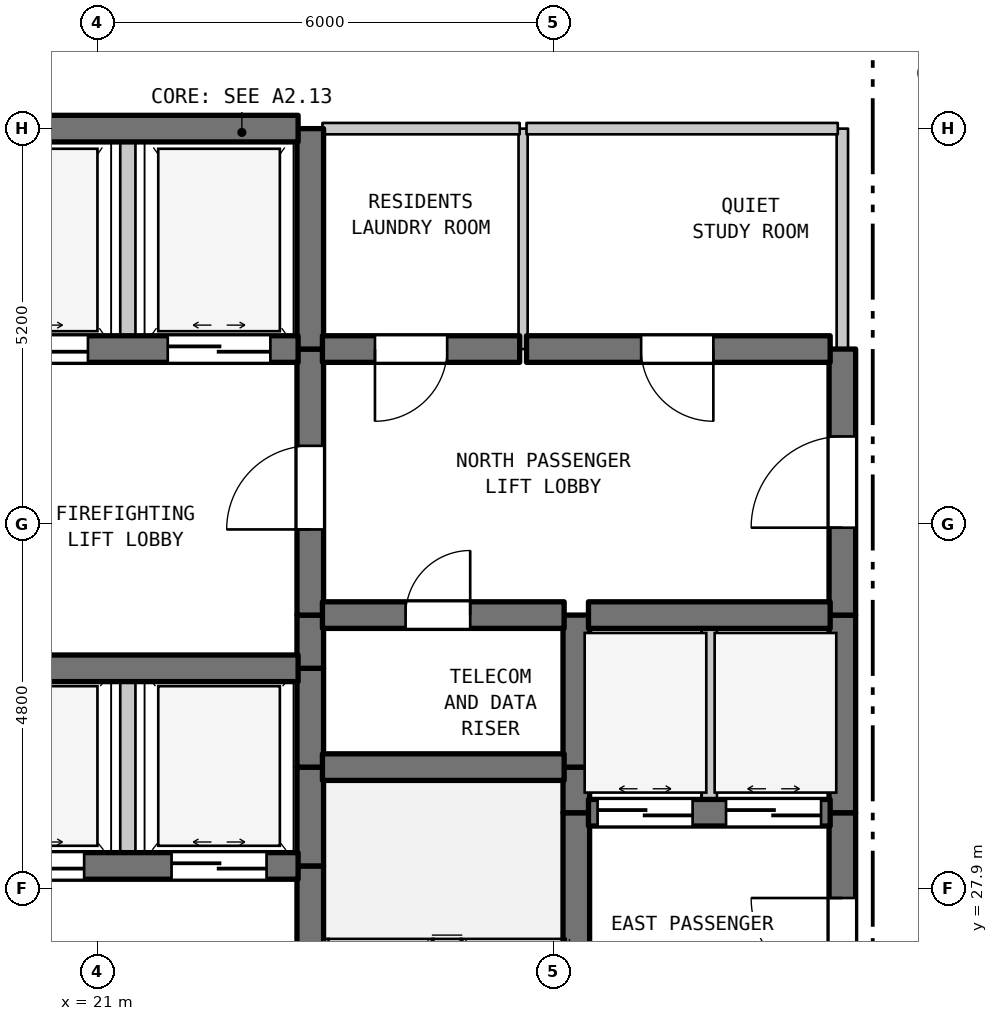
"""IFC4 building model, lengths in metres.
Left out: names, types, materials, properties, quantities, classifications, styles, units other than length and angle.
Written with IfcOpenShell. Run it as: python <this file> out.ifc"""

import sys

from ifc_helpers import new_model, si_unit, direction, frame, frame_2d, origin, place, context, subcontext, project, spatial, rectangle, extrude, element, fill, save


model = new_model("IFC4")
c1 = context("Model", 3, precision=1e-05, world=origin(), true_north=direction((0.0, 1.0)))
c2 = subcontext(c1, "Body", "Model", "MODEL_VIEW")
j1 = project(units=[si_unit("LENGTHUNIT", "METRE"), si_unit("PLANEANGLEUNIT", "RADIAN")], contexts=[c1])
p1 = place(None, origin())
s1 = spatial("IfcSite", under=j1, at=p1, CompositionType="ELEMENT")
p2 = place(p1, origin())
s2 = spatial("IfcBuilding", under=s1, at=p2, CompositionType="ELEMENT")
p3 = place(p2, frame((0.0, 0.0, 199.5)))
s3 = spatial("IfcBuildingStorey", under=s2, at=p3, CompositionType="ELEMENT", Elevation=199.5)
p4 = place(p3, frame((21.4, 28.2, 0.0), z_axis=(0.0, 0.0, 1.0), x_axis=(0.0, 1.0, 0.0)))
e1 = element("IfcWall", 1, at=p4, inside=s3, PredefinedType="STANDARD", context=c2, shape_type="SweptSolid", body=[
    extrude(rectangle(XDim=2.6, YDim=0.2, at=frame_2d((1.3, 0.0))), origin(), (0.0, 0.0, 1.0), 3.39),
])
p5 = place(p3, frame((21.4, 35.0, 0.0), z_axis=(0.0, 0.0, 1.0), x_axis=(0.0, 1.0, 0.0)))
e2 = element("IfcWall", 2, at=p5, inside=s3, PredefinedType="STANDARD", context=c2, shape_type="SweptSolid", body=[
    extrude(rectangle(XDim=2.9, YDim=0.2, at=frame_2d((1.45, 0.0))), origin(), (0.0, 0.0, 1.0), 3.39),
])
p6 = place(p3, frame((23.8, 22.7, 0.0), z_axis=(0.0, 0.0, 1.0), x_axis=(0.0, 1.0, 0.0)))
e3 = element("IfcWall", 3, at=p6, inside=s3, PredefinedType="SHEAR", context=c2, shape_type="SweptSolid", body=[
    extrude(rectangle(XDim=5.5, YDim=0.35, at=frame_2d((2.75, 0.0))), origin(), (0.0, 0.0, 1.0), 3.39),
])
p7 = place(p6, frame((0.235, 0.0, 0.0)))
e4 = element("IfcOpeningElement", 4, at=p7, cuts=e3, PredefinedType="OPENING", context=c2, shape_type="SweptSolid", body=[
    extrude(rectangle(XDim=1.1, YDim=2.15, at=frame_2d((0.55, 1.075))), frame((0.0, 0.185, 0.0), z_axis=(0.0, -1.0, 0.0), x_axis=(1.0, 0.0, 0.0)), (0.0, 0.0, 1.0), 0.37),
])
for number, where, z_axis, x_axis in (
    (5, (23.8, 28.2, 0.0), (0.0, 0.0, 1.0), (0.0, 1.0, 0.0)),
    (6, (23.8, 29.5, 0.0), (0.0, 0.0, 1.0), (0.0, 1.0, 0.0)),
):
    element("IfcWall", number, at=place(p3, frame(where, z_axis=z_axis, x_axis=x_axis)), inside=s3, PredefinedType="SHEAR", context=c2, shape_type="SweptSolid", body=[
        extrude(rectangle(XDim=1.3, YDim=0.35, at=frame_2d((0.65, 0.0))), origin(), (0.0, 0.0, 1.0), 3.39),
    ])
p8 = place(p3, frame((23.8, 30.8, 0.0), z_axis=(0.0, 0.0, 1.0), x_axis=(0.0, 1.0, 0.0)))
e7 = element("IfcWall", 7, at=p8, inside=s3, PredefinedType="SHEAR", context=c2, shape_type="SweptSolid", body=[
    extrude(rectangle(XDim=0.7, YDim=0.35, at=frame_2d((0.35, 0.0))), origin(), (0.0, 0.0, 1.0), 3.39),
])
p9 = place(p3, frame((23.8, 31.5, 0.0), z_axis=(0.0, 0.0, 1.0), x_axis=(0.0, 1.0, 0.0)))
e8 = element("IfcWall", 8, at=p9, inside=s3, PredefinedType="SHEAR", context=c2, shape_type="SweptSolid", body=[
    extrude(rectangle(XDim=3.5, YDim=0.35, at=frame_2d((1.75, 0.0))), origin(), (0.0, 0.0, 1.0), 3.39),
])
p10 = place(p9, frame((1.127, 0.0, 0.0)))
e9 = element("IfcOpeningElement", 9, at=p10, cuts=e8, PredefinedType="OPENING", context=c2, shape_type="SweptSolid", body=[
    extrude(rectangle(XDim=1.1, YDim=2.15, at=frame_2d((0.55, 1.075))), frame((0.0, 0.185, 0.0), z_axis=(0.0, -1.0, 0.0), x_axis=(1.0, 0.0, 0.0)), (0.0, 0.0, 1.0), 0.37),
])
p11 = place(p3, frame((23.8, 35.0, 0.0), z_axis=(0.0, 0.0, 1.0), x_axis=(0.0, 1.0, 0.0)))
e10 = element("IfcWall", 10, at=p11, inside=s3, PredefinedType="SHEAR", context=c2, shape_type="SweptSolid", body=[
    extrude(rectangle(XDim=2.9, YDim=0.35, at=frame_2d((1.45, 0.0))), origin(), (0.0, 0.0, 1.0), 3.39),
])
p12 = place(p3, frame((26.6, 35.0, 0.0), z_axis=(0.0, 0.0, 1.0), x_axis=(0.0, 1.0, 0.0)))
e11 = element("IfcWall", 11, at=p12, inside=s3, PredefinedType="PARTITIONING", context=c2, shape_type="SweptSolid", body=[
    extrude(rectangle(XDim=2.9, YDim=0.12, at=frame_2d((1.45, 0.0))), origin(), (0.0, 0.0, 1.0), 3.39),
])
p13 = place(p3, frame((27.3, 25.6, 0.0), z_axis=(0.0, 0.0, 1.0), x_axis=(0.0, 1.0, 0.0)))
e12 = element("IfcWall", 12, at=p13, inside=s3, PredefinedType="SHEAR", context=c2, shape_type="SweptSolid", body=[
    extrude(rectangle(XDim=3.3, YDim=0.35, at=frame_2d((1.65, 0.0))), origin(), (0.0, 0.0, 1.0), 3.39),
])
p14 = place(p3, frame((27.3, 28.9, 0.0), z_axis=(0.0, 0.0, 1.0), x_axis=(0.0, 1.0, 0.0)))
e13 = element("IfcWall", 13, at=p14, inside=s3, PredefinedType="SHEAR", context=c2, shape_type="SweptSolid", body=[
    extrude(rectangle(XDim=0.6, YDim=0.35, at=frame_2d((0.3, 0.0))), origin(), (0.0, 0.0, 1.0), 3.39),
])
p15 = place(p3, frame((27.3, 29.5, 0.0), z_axis=(0.0, 0.0, 1.0), x_axis=(0.0, 1.0, 0.0)))
e14 = element("IfcWall", 14, at=p15, inside=s3, PredefinedType="SHEAR", context=c2, shape_type="SweptSolid", body=[
    extrude(rectangle(XDim=2.0, YDim=0.35, at=frame_2d((1.0, 0.0))), origin(), (0.0, 0.0, 1.0), 3.39),
])
p16 = place(p3, frame((29.05, 28.9, 0.0), z_axis=(0.0, 0.0, 1.0), x_axis=(0.0, 1.0, 0.0)))
e15 = element("IfcWall", 15, at=p16, inside=s3, PredefinedType="STANDARD", context=c2, shape_type="SweptSolid", body=[
    extrude(rectangle(XDim=2.6, YDim=0.2, at=frame_2d((1.3, 0.0))), origin(), (0.0, 0.0, 1.0), 3.39),
])
p17 = place(p3, frame((30.8, 25.6, 0.0), z_axis=(0.0, 0.0, 1.0), x_axis=(0.0, 1.0, 0.0)))
e16 = element("IfcWall", 16, at=p17, inside=s3, PredefinedType="SHEAR", context=c2, shape_type="SweptSolid", body=[
    extrude(rectangle(XDim=3.3, YDim=0.35, at=frame_2d((1.65, 0.0))), origin(), (0.0, 0.0, 1.0), 3.39),
])
p18 = place(p17, frame((0.978, 0.0, 0.0)))
e17 = element("IfcOpeningElement", 17, at=p18, cuts=e16, PredefinedType="OPENING", context=c2, shape_type="SweptSolid", body=[
    extrude(rectangle(XDim=1.2, YDim=2.2, at=frame_2d((0.6, 1.1))), frame((0.0, 0.185, 0.0), z_axis=(0.0, -1.0, 0.0), x_axis=(1.0, 0.0, 0.0)), (0.0, 0.0, 1.0), 0.37),
])
p19 = place(p3, frame((30.8, 28.9, 0.0), z_axis=(0.0, 0.0, 1.0), x_axis=(0.0, 1.0, 0.0)))
e18 = element("IfcWall", 18, at=p19, inside=s3, PredefinedType="SHEAR", context=c2, shape_type="SweptSolid", body=[
    extrude(rectangle(XDim=2.6, YDim=0.35, at=frame_2d((1.3, 0.0))), origin(), (0.0, 0.0, 1.0), 3.39),
])
p20 = place(p3, frame((30.8, 31.5, 0.0), z_axis=(0.0, 0.0, 1.0), x_axis=(0.0, 1.0, 0.0)))
e19 = element("IfcWall", 19, at=p20, inside=s3, PredefinedType="SHEAR", context=c2, shape_type="SweptSolid", body=[
    extrude(rectangle(XDim=3.5, YDim=0.35, at=frame_2d((1.75, 0.0))), origin(), (0.0, 0.0, 1.0), 3.39),
])
p21 = place(p20, frame((1.15, 0.0, 0.0)))
e20 = element("IfcOpeningElement", 20, at=p21, cuts=e19, PredefinedType="OPENING", context=c2, shape_type="SweptSolid", body=[
    extrude(rectangle(XDim=1.2, YDim=2.2, at=frame_2d((0.6, 1.1))), frame((0.0, 0.185, 0.0), z_axis=(0.0, -1.0, 0.0), x_axis=(1.0, 0.0, 0.0)), (0.0, 0.0, 1.0), 0.37),
])
p22 = place(p3, frame((30.8, 35.0, 0.0), z_axis=(0.0, 0.0, 1.0), x_axis=(0.0, 1.0, 0.0)))
e21 = element("IfcWall", 21, at=p22, inside=s3, PredefinedType="STANDARD", context=c2, shape_type="SweptSolid", body=[
    extrude(rectangle(XDim=2.9, YDim=0.15, at=frame_2d((1.45, 0.0))), origin(), (0.0, 0.0, 1.0), 3.39),
])
p23 = place(p3, frame((19.16, 28.2, 0.0), z_axis=(0.0, 0.0, 1.0), x_axis=(1.0, 0.0, 0.0)))
e22 = element("IfcWall", 22, at=p23, inside=s3, PredefinedType="SHEAR", context=c2, shape_type="SweptSolid", body=[
    extrude(rectangle(XDim=4.48, YDim=0.35, at=frame_2d((2.24, 0.0))), origin(), (0.0, 0.0, 1.0), 3.39),
])
p24 = place(p23, frame((0.415, 0.0, 0.0)))
e23 = element("IfcOpeningElement", 23, at=p24, cuts=e22, PredefinedType="OPENING", context=c2, shape_type="SweptSolid", body=[
    extrude(rectangle(XDim=1.25, YDim=2.2, at=frame_2d((0.625, 1.1))), frame((0.0, 0.185, 0.0), z_axis=(0.0, -1.0, 0.0), x_axis=(1.0, 0.0, 0.0)), (0.0, 0.0, 1.0), 0.37),
])
p25 = place(p23, frame((2.815, 0.0, 0.0)))
e24 = element("IfcOpeningElement", 24, at=p25, cuts=e22, PredefinedType="OPENING", context=c2, shape_type="SweptSolid", body=[
    extrude(rectangle(XDim=1.25, YDim=2.2, at=frame_2d((0.625, 1.1))), frame((0.0, 0.185, 0.0), z_axis=(0.0, -1.0, 0.0), x_axis=(1.0, 0.0, 0.0)), (0.0, 0.0, 1.0), 0.37),
])
p26 = place(p3, frame((27.46, 28.9, 0.0), z_axis=(0.0, 0.0, 1.0), x_axis=(1.0, 0.0, 0.0)))
e25 = element("IfcWall", 25, at=p26, inside=s3, PredefinedType="SHEAR", context=c2, shape_type="SweptSolid", body=[
    extrude(rectangle(XDim=3.18, YDim=0.35, at=frame_2d((1.59, 0.0))), origin(), (0.0, 0.0, 1.0), 3.39),
])
p27 = place(p26, frame((0.12, 0.0, 0.0)))
e26 = element("IfcOpeningElement", 26, at=p27, cuts=e25, PredefinedType="OPENING", context=c2, shape_type="SweptSolid", body=[
    extrude(rectangle(XDim=1.25, YDim=2.2, at=frame_2d((0.625, 1.1))), frame((0.0, 0.185, 0.0), z_axis=(0.0, -1.0, 0.0), x_axis=(1.0, 0.0, 0.0)), (0.0, 0.0, 1.0), 0.37),
])
p28 = place(p26, frame((1.81, 0.0, 0.0)))
e27 = element("IfcOpeningElement", 27, at=p28, cuts=e25, PredefinedType="OPENING", context=c2, shape_type="SweptSolid", body=[
    extrude(rectangle(XDim=1.25, YDim=2.2, at=frame_2d((0.625, 1.1))), frame((0.0, 0.185, 0.0), z_axis=(0.0, -1.0, 0.0), x_axis=(1.0, 0.0, 0.0)), (0.0, 0.0, 1.0), 0.37),
])
p29 = place(p3, frame((23.96, 29.5, 0.0), z_axis=(0.0, 0.0, 1.0), x_axis=(1.0, 0.0, 0.0)))
e28 = element("IfcWall", 28, at=p29, inside=s3, PredefinedType="SHEAR", context=c2, shape_type="SweptSolid", body=[
    extrude(rectangle(XDim=3.18, YDim=0.35, at=frame_2d((1.59, 0.0))), origin(), (0.0, 0.0, 1.0), 3.39),
])
p30 = place(p3, frame((19.16, 30.8, 0.0), z_axis=(0.0, 0.0, 1.0), x_axis=(1.0, 0.0, 0.0)))
e29 = element("IfcWall", 29, at=p30, inside=s3, PredefinedType="SHEAR", context=c2, shape_type="SweptSolid", body=[
    extrude(rectangle(XDim=4.48, YDim=0.35, at=frame_2d((2.24, 0.0))), origin(), (0.0, 0.0, 1.0), 3.39),
])
p31 = place(p3, frame((23.96, 31.5, 0.0), z_axis=(0.0, 0.0, 1.0), x_axis=(1.0, 0.0, 0.0)))
e30 = element("IfcWall", 30, at=p31, inside=s3, PredefinedType="SHEAR", context=c2, shape_type="SweptSolid", body=[
    extrude(rectangle(XDim=3.18, YDim=0.35, at=frame_2d((1.59, 0.0))), origin(), (0.0, 0.0, 1.0), 3.39),
])
p32 = place(p31, frame((1.094, 0.0, 0.0)))
e31 = element("IfcOpeningElement", 31, at=p32, cuts=e30, PredefinedType="OPENING", context=c2, shape_type="SweptSolid", body=[
    extrude(rectangle(XDim=0.85, YDim=2.1, at=frame_2d((0.425, 1.05))), frame((0.0, 0.185, 0.0), z_axis=(0.0, -1.0, 0.0), x_axis=(1.0, 0.0, 0.0)), (0.0, 0.0, 1.0), 0.37),
])
p33 = place(p3, frame((27.46, 31.5, 0.0), z_axis=(0.0, 0.0, 1.0), x_axis=(1.0, 0.0, 0.0)))
e32 = element("IfcWall", 32, at=p33, inside=s3, PredefinedType="SHEAR", context=c2, shape_type="SweptSolid", body=[
    extrude(rectangle(XDim=3.18, YDim=0.35, at=frame_2d((1.59, 0.0))), origin(), (0.0, 0.0, 1.0), 3.39),
])
p34 = place(p3, frame((19.16, 35.0, 0.0), z_axis=(0.0, 0.0, 1.0), x_axis=(1.0, 0.0, 0.0)))
e33 = element("IfcWall", 33, at=p34, inside=s3, PredefinedType="SHEAR", context=c2, shape_type="SweptSolid", body=[
    extrude(rectangle(XDim=4.48, YDim=0.35, at=frame_2d((2.24, 0.0))), origin(), (0.0, 0.0, 1.0), 3.39),
])
p35 = place(p34, frame((0.365, 0.0, 0.0)))
e34 = element("IfcOpeningElement", 34, at=p35, cuts=e33, PredefinedType="OPENING", context=c2, shape_type="SweptSolid", body=[
    extrude(rectangle(XDim=1.35, YDim=2.2, at=frame_2d((0.675, 1.1))), frame((0.0, 0.185, 0.0), z_axis=(0.0, -1.0, 0.0), x_axis=(1.0, 0.0, 0.0)), (0.0, 0.0, 1.0), 0.37),
])
p36 = place(p34, frame((2.765, 0.0, 0.0)))
e35 = element("IfcOpeningElement", 35, at=p36, cuts=e33, PredefinedType="OPENING", context=c2, shape_type="SweptSolid", body=[
    extrude(rectangle(XDim=1.35, YDim=2.2, at=frame_2d((0.675, 1.1))), frame((0.0, 0.185, 0.0), z_axis=(0.0, -1.0, 0.0), x_axis=(1.0, 0.0, 0.0)), (0.0, 0.0, 1.0), 0.37),
])
p37 = place(p3, frame((23.96, 35.0, 0.0), z_axis=(0.0, 0.0, 1.0), x_axis=(1.0, 0.0, 0.0)))
e36 = element("IfcWall", 36, at=p37, inside=s3, PredefinedType="SHEAR", context=c2, shape_type="SweptSolid", body=[
    extrude(rectangle(XDim=2.595, YDim=0.35, at=frame_2d((1.297, 0.0))), origin(), (0.0, 0.0, 1.0), 3.39),
])
p38 = place(p37, frame((0.691, 0.0, 0.0)))
e37 = element("IfcOpeningElement", 37, at=p38, cuts=e36, PredefinedType="OPENING", context=c2, shape_type="SweptSolid", body=[
    extrude(rectangle(XDim=0.95, YDim=2.15, at=frame_2d((0.475, 1.075))), frame((0.0, 0.185, 0.0), z_axis=(0.0, -1.0, 0.0), x_axis=(1.0, 0.0, 0.0)), (0.0, 0.0, 1.0), 0.37),
])
p39 = place(p3, frame((26.645, 35.0, 0.0), z_axis=(0.0, 0.0, 1.0), x_axis=(1.0, 0.0, 0.0)))
e38 = element("IfcWall", 38, at=p39, inside=s3, PredefinedType="SHEAR", context=c2, shape_type="SweptSolid", body=[
    extrude(rectangle(XDim=3.995, YDim=0.35, at=frame_2d((1.998, 0.0))), origin(), (0.0, 0.0, 1.0), 3.39),
])
p40 = place(p39, frame((1.508, 0.0, 0.0)))
e39 = element("IfcOpeningElement", 39, at=p40, cuts=e38, PredefinedType="OPENING", context=c2, shape_type="SweptSolid", body=[
    extrude(rectangle(XDim=0.95, YDim=2.15, at=frame_2d((0.475, 1.075))), frame((0.0, 0.185, 0.0), z_axis=(0.0, -1.0, 0.0), x_axis=(1.0, 0.0, 0.0)), (0.0, 0.0, 1.0), 0.37),
])
p41 = place(p3, frame((19.16, 37.9, 0.0), z_axis=(0.0, 0.0, 1.0), x_axis=(1.0, 0.0, 0.0)))
e40 = element("IfcWall", 40, at=p41, inside=s3, PredefinedType="SHEAR", context=c2, shape_type="SweptSolid", body=[
    extrude(rectangle(XDim=4.48, YDim=0.35, at=frame_2d((2.24, 0.0))), origin(), (0.0, 0.0, 1.0), 3.39),
])
p42 = place(p3, frame((23.96, 37.9, 0.0), z_axis=(0.0, 0.0, 1.0), x_axis=(1.0, 0.0, 0.0)))
e41 = element("IfcWall", 41, at=p42, inside=s3, PredefinedType="STANDARD", context=c2, shape_type="SweptSolid", body=[
    extrude(rectangle(XDim=2.595, YDim=0.15, at=frame_2d((1.297, 0.0))), origin(), (0.0, 0.0, 1.0), 2.89),
])
p43 = place(p3, frame((26.645, 37.9, 0.0), z_axis=(0.0, 0.0, 1.0), x_axis=(1.0, 0.0, 0.0)))
e42 = element("IfcWall", 42, at=p43, inside=s3, PredefinedType="STANDARD", context=c2, shape_type="SweptSolid", body=[
    extrude(rectangle(XDim=4.095, YDim=0.15, at=frame_2d((2.047, 0.0))), origin(), (0.0, 0.0, 1.0), 2.89),
])
p44 = place(p10, origin())
e43 = element("IfcDoor", 43, at=p44, inside=s3, OperationType="SINGLE_SWING_LEFT", PredefinedType="DOOR", context=c2, shape_type="SweptSolid", body=[
    extrude(rectangle(XDim=1.1, YDim=2.15, at=frame_2d((0.55, 1.075))), frame((0.0, 0.025, 0.0), z_axis=(0.0, -1.0, 0.0), x_axis=(1.0, 0.0, 0.0)), (0.0, 0.0, 1.0), 0.05),
])
fill(e9, e43)
p45 = place(p18, origin())
e44 = element("IfcDoor", 44, at=p45, inside=s3, OperationType="SINGLE_SWING_RIGHT", PredefinedType="DOOR", context=c2, shape_type="SweptSolid", body=[
    extrude(rectangle(XDim=1.2, YDim=2.2, at=frame_2d((0.6, 1.1))), frame((0.0, 0.025, 0.0), z_axis=(0.0, -1.0, 0.0), x_axis=(1.0, 0.0, 0.0)), (0.0, 0.0, 1.0), 0.05),
])
fill(e17, e44)
p46 = place(p21, origin())
e45 = element("IfcDoor", 45, at=p46, inside=s3, OperationType="SINGLE_SWING_LEFT", PredefinedType="DOOR", context=c2, shape_type="SweptSolid", body=[
    extrude(rectangle(XDim=1.2, YDim=2.2, at=frame_2d((0.6, 1.1))), frame((0.0, 0.025, 0.0), z_axis=(0.0, -1.0, 0.0), x_axis=(1.0, 0.0, 0.0)), (0.0, 0.0, 1.0), 0.05),
])
fill(e20, e45)
p47 = place(p24, origin())
e46 = element("IfcDoor", 46, at=p47, inside=s3, OperationType="DOUBLE_DOOR_SLIDING", PredefinedType="DOOR", context=c2, shape_type="SweptSolid", body=[
    extrude(rectangle(XDim=1.25, YDim=2.2, at=frame_2d((0.625, 1.1))), frame((0.0, 0.025, 0.0), z_axis=(0.0, -1.0, 0.0), x_axis=(1.0, 0.0, 0.0)), (0.0, 0.0, 1.0), 0.05),
])
fill(e23, e46)
p48 = place(p25, origin())
e47 = element("IfcDoor", 47, at=p48, inside=s3, OperationType="DOUBLE_DOOR_SLIDING", PredefinedType="DOOR", context=c2, shape_type="SweptSolid", body=[
    extrude(rectangle(XDim=1.25, YDim=2.2, at=frame_2d((0.625, 1.1))), frame((0.0, 0.025, 0.0), z_axis=(0.0, -1.0, 0.0), x_axis=(1.0, 0.0, 0.0)), (0.0, 0.0, 1.0), 0.05),
])
fill(e24, e47)
p49 = place(p27, origin())
e48 = element("IfcDoor", 48, at=p49, inside=s3, OperationType="DOUBLE_DOOR_SLIDING", PredefinedType="DOOR", context=c2, shape_type="SweptSolid", body=[
    extrude(rectangle(XDim=1.25, YDim=2.2, at=frame_2d((0.625, 1.1))), frame((0.0, 0.025, 0.0), z_axis=(0.0, -1.0, 0.0), x_axis=(1.0, 0.0, 0.0)), (0.0, 0.0, 1.0), 0.05),
])
fill(e26, e48)
p50 = place(p28, origin())
e49 = element("IfcDoor", 49, at=p50, inside=s3, OperationType="DOUBLE_DOOR_SLIDING", PredefinedType="DOOR", context=c2, shape_type="SweptSolid", body=[
    extrude(rectangle(XDim=1.25, YDim=2.2, at=frame_2d((0.625, 1.1))), frame((0.0, 0.025, 0.0), z_axis=(0.0, -1.0, 0.0), x_axis=(1.0, 0.0, 0.0)), (0.0, 0.0, 1.0), 0.05),
])
fill(e27, e49)
p51 = place(p32, origin())
e50 = element("IfcDoor", 50, at=p51, inside=s3, OperationType="SINGLE_SWING_RIGHT", PredefinedType="DOOR", context=c2, shape_type="SweptSolid", body=[
    extrude(rectangle(XDim=0.85, YDim=2.1, at=frame_2d((0.425, 1.05))), frame((0.0, 0.025, 0.0), z_axis=(0.0, -1.0, 0.0), x_axis=(1.0, 0.0, 0.0)), (0.0, 0.0, 1.0), 0.05),
])
fill(e31, e50)
p52 = place(p35, origin())
e51 = element("IfcDoor", 51, at=p52, inside=s3, OperationType="DOUBLE_DOOR_SLIDING", PredefinedType="DOOR", context=c2, shape_type="SweptSolid", body=[
    extrude(rectangle(XDim=1.35, YDim=2.2, at=frame_2d((0.675, 1.1))), frame((0.0, 0.025, 0.0), z_axis=(0.0, -1.0, 0.0), x_axis=(1.0, 0.0, 0.0)), (0.0, 0.0, 1.0), 0.05),
])
fill(e34, e51)
p53 = place(p36, origin())
e52 = element("IfcDoor", 52, at=p53, inside=s3, OperationType="DOUBLE_DOOR_SLIDING", PredefinedType="DOOR", context=c2, shape_type="SweptSolid", body=[
    extrude(rectangle(XDim=1.35, YDim=2.2, at=frame_2d((0.675, 1.1))), frame((0.0, 0.025, 0.0), z_axis=(0.0, -1.0, 0.0), x_axis=(1.0, 0.0, 0.0)), (0.0, 0.0, 1.0), 0.05),
])
fill(e35, e52)
p54 = place(p38, frame((0.95, 0.0, 0.0), z_axis=(0.0, 0.0, 1.0), x_axis=(-1.0, 0.0, 0.0)))
e53 = element("IfcDoor", 53, at=p54, inside=s3, OperationType="SINGLE_SWING_LEFT", PredefinedType="DOOR", context=c2, shape_type="SweptSolid", body=[
    extrude(rectangle(XDim=0.95, YDim=2.15, at=frame_2d((0.475, 1.075))), frame((0.0, 0.025, 0.0), z_axis=(0.0, -1.0, 0.0), x_axis=(1.0, 0.0, 0.0)), (0.0, 0.0, 1.0), 0.05),
])
fill(e37, e53)
p55 = place(p40, frame((0.95, 0.0, 0.0), z_axis=(0.0, 0.0, 1.0), x_axis=(-1.0, 0.0, 0.0)))
e54 = element("IfcDoor", 54, at=p55, inside=s3, OperationType="SINGLE_SWING_RIGHT", PredefinedType="DOOR", context=c2, shape_type="SweptSolid", body=[
    extrude(rectangle(XDim=0.95, YDim=2.15, at=frame_2d((0.475, 1.075))), frame((0.0, 0.025, 0.0), z_axis=(0.0, -1.0, 0.0), x_axis=(1.0, 0.0, 0.0)), (0.0, 0.0, 1.0), 0.05),
])
fill(e39, e54)
save(model, sys.argv[1])
